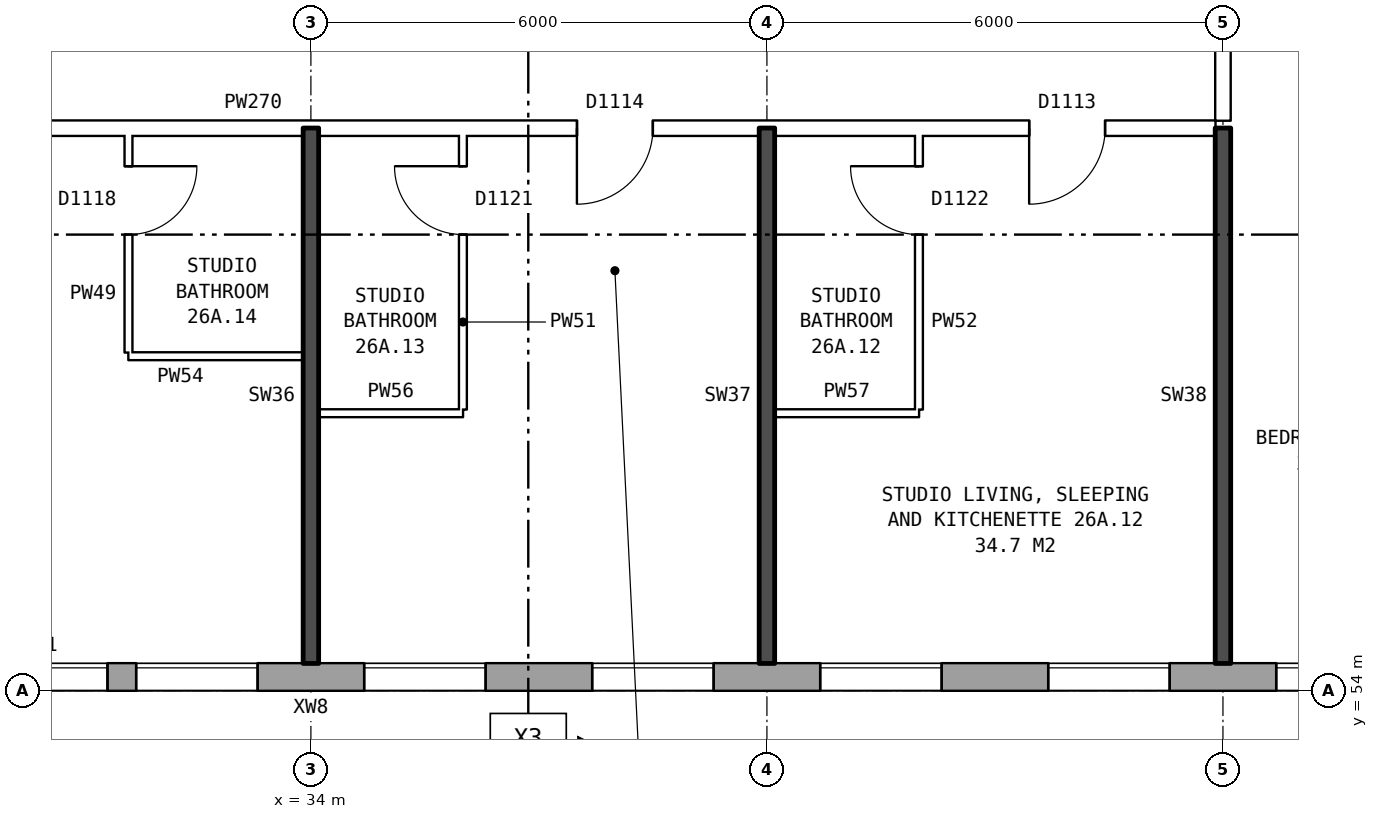
"""IFC4 building model, lengths in metres.
Left out: names, types, materials, properties, quantities, classifications, styles, units other than length and angle.
Written with IfcOpenShell. Run it as: python <this file> out.ifc"""

import sys

from ifc_helpers import new_model, si_unit, direction, frame, frame_2d, origin, place, context, subcontext, project, spatial, rectangle, extrude, element, fill, save


model = new_model("IFC4")
c1 = context("Model", 3, precision=1e-05, world=origin(), true_north=direction((0.0, 1.0)))
c2 = subcontext(c1, "Body", "Model", "MODEL_VIEW")
j1 = project(units=[si_unit("LENGTHUNIT", "METRE"), si_unit("PLANEANGLEUNIT", "RADIAN")], contexts=[c1])
p1 = place(None, origin())
s1 = spatial("IfcSite", under=j1, at=p1, CompositionType="ELEMENT")
p2 = place(p1, origin())
s2 = spatial("IfcBuilding", under=s1, at=p2, CompositionType="ELEMENT")
p3 = place(p2, frame((0.0, 0.0, 96.4)))
s3 = spatial("IfcBuildingStorey", under=s2, at=p3, CompositionType="ELEMENT", Elevation=96.4)
p4 = place(p3, frame((28.075, 54.18, 0.0), z_axis=(0.0, 0.0, 1.0), x_axis=(1.0, 0.0, 0.0)))
e1 = element("IfcWall", 1, at=p4, inside=s3, PredefinedType="STANDARD", context=c2, shape_type="SweptSolid", body=[
    extrude(rectangle(XDim=44.851, YDim=0.36, at=frame_2d((22.425, 0.0))), origin(), (0.0, 0.0, 1.0), 2.85),
])
p5 = place(p4, frame((0.4, 0.0, 0.8)))
e2 = element("IfcOpeningElement", 2, at=p5, cuts=e1, PredefinedType="OPENING", context=c2, shape_type="SweptSolid", body=[
    extrude(rectangle(XDim=0.8, YDim=0.9, at=frame_2d((0.4, 0.45))), frame((0.0, 0.19, 0.0), z_axis=(0.0, -1.0, 0.0), x_axis=(1.0, 0.0, 0.0)), (0.0, 0.0, 1.0), 0.38),
])
p6 = place(p4, frame((3.625, 0.0, 0.8)))
e3 = element("IfcOpeningElement", 3, at=p6, cuts=e1, PredefinedType="OPENING", context=c2, shape_type="SweptSolid", body=[
    extrude(rectangle(XDim=1.6, YDim=1.8, at=frame_2d((0.8, 0.9))), frame((0.0, 0.19, 0.0), z_axis=(0.0, -1.0, 0.0), x_axis=(1.0, 0.0, 0.0)), (0.0, 0.0, 1.0), 0.38),
])
p7 = place(p4, frame((6.625, 0.0, 0.8)))
e4 = element("IfcOpeningElement", 4, at=p7, cuts=e1, PredefinedType="OPENING", context=c2, shape_type="SweptSolid", body=[
    extrude(rectangle(XDim=1.6, YDim=1.8, at=frame_2d((0.8, 0.9))), frame((0.0, 0.19, 0.0), z_axis=(0.0, -1.0, 0.0), x_axis=(1.0, 0.0, 0.0)), (0.0, 0.0, 1.0), 0.38),
])
p8 = place(p4, frame((9.625, 0.0, 0.8)))
e5 = element("IfcOpeningElement", 5, at=p8, cuts=e1, PredefinedType="OPENING", context=c2, shape_type="SweptSolid", body=[
    extrude(rectangle(XDim=1.6, YDim=1.8, at=frame_2d((0.8, 0.9))), frame((0.0, 0.19, 0.0), z_axis=(0.0, -1.0, 0.0), x_axis=(1.0, 0.0, 0.0)), (0.0, 0.0, 1.0), 0.38),
])
p9 = place(p4, frame((12.625, 0.0, 0.8)))
e6 = element("IfcOpeningElement", 6, at=p9, cuts=e1, PredefinedType="OPENING", context=c2, shape_type="SweptSolid", body=[
    extrude(rectangle(XDim=1.6, YDim=1.8, at=frame_2d((0.8, 0.9))), frame((0.0, 0.19, 0.0), z_axis=(0.0, -1.0, 0.0), x_axis=(1.0, 0.0, 0.0)), (0.0, 0.0, 1.0), 0.38),
])
p10 = place(p4, frame((15.625, 0.0, 0.8)))
e7 = element("IfcOpeningElement", 7, at=p10, cuts=e1, PredefinedType="OPENING", context=c2, shape_type="SweptSolid", body=[
    extrude(rectangle(XDim=1.6, YDim=1.8, at=frame_2d((0.8, 0.9))), frame((0.0, 0.19, 0.0), z_axis=(0.0, -1.0, 0.0), x_axis=(1.0, 0.0, 0.0)), (0.0, 0.0, 1.0), 0.38),
])
p11 = place(p4, frame((18.625, 0.0, 0.8)))
e8 = element("IfcOpeningElement", 8, at=p11, cuts=e1, PredefinedType="OPENING", context=c2, shape_type="SweptSolid", body=[
    extrude(rectangle(XDim=1.6, YDim=1.8, at=frame_2d((0.8, 0.9))), frame((0.0, 0.19, 0.0), z_axis=(0.0, -1.0, 0.0), x_axis=(1.0, 0.0, 0.0)), (0.0, 0.0, 1.0), 0.38),
])
p12 = place(p4, frame((21.625, 0.0, 0.8)))
e9 = element("IfcOpeningElement", 9, at=p12, cuts=e1, PredefinedType="OPENING", context=c2, shape_type="SweptSolid", body=[
    extrude(rectangle(XDim=1.6, YDim=1.8, at=frame_2d((0.8, 0.9))), frame((0.0, 0.19, 0.0), z_axis=(0.0, -1.0, 0.0), x_axis=(1.0, 0.0, 0.0)), (0.0, 0.0, 1.0), 0.38),
])
p13 = place(p4, frame((24.625, 0.0, 0.8)))
e10 = element("IfcOpeningElement", 10, at=p13, cuts=e1, PredefinedType="OPENING", context=c2, shape_type="SweptSolid", body=[
    extrude(rectangle(XDim=1.6, YDim=1.8, at=frame_2d((0.8, 0.9))), frame((0.0, 0.19, 0.0), z_axis=(0.0, -1.0, 0.0), x_axis=(1.0, 0.0, 0.0)), (0.0, 0.0, 1.0), 0.38),
])
p14 = place(p4, frame((27.625, 0.0, 0.8)))
e11 = element("IfcOpeningElement", 11, at=p14, cuts=e1, PredefinedType="OPENING", context=c2, shape_type="SweptSolid", body=[
    extrude(rectangle(XDim=1.6, YDim=1.8, at=frame_2d((0.8, 0.9))), frame((0.0, 0.19, 0.0), z_axis=(0.0, -1.0, 0.0), x_axis=(1.0, 0.0, 0.0)), (0.0, 0.0, 1.0), 0.38),
])
p15 = place(p4, frame((30.625, 0.0, 0.8)))
e12 = element("IfcOpeningElement", 12, at=p15, cuts=e1, PredefinedType="OPENING", context=c2, shape_type="SweptSolid", body=[
    extrude(rectangle(XDim=1.6, YDim=1.8, at=frame_2d((0.8, 0.9))), frame((0.0, 0.19, 0.0), z_axis=(0.0, -1.0, 0.0), x_axis=(1.0, 0.0, 0.0)), (0.0, 0.0, 1.0), 0.38),
])
p16 = place(p4, frame((33.625, 0.0, 0.8)))
e13 = element("IfcOpeningElement", 13, at=p16, cuts=e1, PredefinedType="OPENING", context=c2, shape_type="SweptSolid", body=[
    extrude(rectangle(XDim=1.6, YDim=1.8, at=frame_2d((0.8, 0.9))), frame((0.0, 0.19, 0.0), z_axis=(0.0, -1.0, 0.0), x_axis=(1.0, 0.0, 0.0)), (0.0, 0.0, 1.0), 0.38),
])
p17 = place(p4, frame((36.625, 0.0, 0.8)))
e14 = element("IfcOpeningElement", 14, at=p17, cuts=e1, PredefinedType="OPENING", context=c2, shape_type="SweptSolid", body=[
    extrude(rectangle(XDim=1.6, YDim=1.8, at=frame_2d((0.8, 0.9))), frame((0.0, 0.19, 0.0), z_axis=(0.0, -1.0, 0.0), x_axis=(1.0, 0.0, 0.0)), (0.0, 0.0, 1.0), 0.38),
])
p18 = place(p4, frame((39.625, 0.0, 0.8)))
e15 = element("IfcOpeningElement", 15, at=p18, cuts=e1, PredefinedType="OPENING", context=c2, shape_type="SweptSolid", body=[
    extrude(rectangle(XDim=1.6, YDim=1.8, at=frame_2d((0.8, 0.9))), frame((0.0, 0.19, 0.0), z_axis=(0.0, -1.0, 0.0), x_axis=(1.0, 0.0, 0.0)), (0.0, 0.0, 1.0), 0.38),
])
p19 = place(p4, frame((42.125, 0.0, 0.8)))
e16 = element("IfcOpeningElement", 16, at=p19, cuts=e1, PredefinedType="OPENING", context=c2, shape_type="SweptSolid", body=[
    extrude(rectangle(XDim=1.0, YDim=1.8, at=frame_2d((0.5, 0.9))), frame((0.0, 0.19, 0.0), z_axis=(0.0, -1.0, 0.0), x_axis=(1.0, 0.0, 0.0)), (0.0, 0.0, 1.0), 0.38),
])
p20 = place(p4, frame((1.65, 0.0, 0.8)))
e17 = element("IfcOpeningElement", 17, at=p20, cuts=e1, PredefinedType="OPENING", context=c2, shape_type="SweptSolid", body=[
    extrude(rectangle(XDim=1.6, YDim=1.8, at=frame_2d((0.8, 0.9))), frame((0.0, 0.19, 0.0), z_axis=(0.0, -1.0, 0.0), x_axis=(1.0, 0.0, 0.0)), (0.0, 0.0, 1.0), 0.38),
])
p21 = place(p4, frame((43.425, 0.0, 0.8)))
e18 = element("IfcOpeningElement", 18, at=p21, cuts=e1, PredefinedType="OPENING", context=c2, shape_type="SweptSolid", body=[
    extrude(rectangle(XDim=1.0, YDim=0.9, at=frame_2d((0.5, 0.45))), frame((0.0, 0.19, 0.0), z_axis=(0.0, -1.0, 0.0), x_axis=(1.0, 0.0, 0.0)), (0.0, 0.0, 1.0), 0.38),
])
for number, where, z_axis, x_axis in (
    (19, (34.1, 57.65, 0.0), (0.0, 0.0, 1.0), (1.0, 0.0, 0.0)),
    (20, (40.1, 57.65, 0.0), (0.0, 0.0, 1.0), (1.0, 0.0, 0.0)),
):
    element("IfcWall", number, at=place(p3, frame(where, z_axis=z_axis, x_axis=x_axis)), inside=s3, PredefinedType="PARTITIONING", context=c2, shape_type="SweptSolid", body=[
        extrude(rectangle(XDim=1.9, YDim=0.1, at=frame_2d((0.95, 0.0))), origin(), (0.0, 0.0, 1.0), 2.85),
    ])
p22 = place(p3, frame((31.6, 58.4, 0.0), z_axis=(0.0, 0.0, 1.0), x_axis=(1.0, 0.0, 0.0)))
e21 = element("IfcWall", 21, at=p22, inside=s3, PredefinedType="PARTITIONING", context=c2, shape_type="SweptSolid", body=[
    extrude(rectangle(XDim=2.3, YDim=0.1, at=frame_2d((1.15, 0.0))), origin(), (0.0, 0.0, 1.0), 2.85),
])
p23 = place(p3, frame((25.36, 61.4, 0.0), z_axis=(0.0, 0.0, 1.0), x_axis=(1.0, 0.0, 0.0)))
e22 = element("IfcWall", 22, at=p23, inside=s3, PredefinedType="PARTITIONING", context=c2, shape_type="SweptSolid", body=[
    extrude(rectangle(XDim=20.54, YDim=0.2, at=frame_2d((10.27, 0.0))), origin(), (0.0, 0.0, 1.0), 2.85),
])
p24 = place(p23, frame((18.09, 0.0, 0.0)))
e23 = element("IfcOpeningElement", 23, at=p24, cuts=e22, PredefinedType="OPENING", context=c2, shape_type="SweptSolid", body=[
    extrude(rectangle(XDim=1.0, YDim=2.1, at=frame_2d((0.5, 1.05))), frame((0.0, 0.11, 0.0), z_axis=(0.0, -1.0, 0.0), x_axis=(1.0, 0.0, 0.0)), (0.0, 0.0, 1.0), 0.22),
])
p25 = place(p23, frame((12.14, 0.0, 0.0)))
e24 = element("IfcOpeningElement", 24, at=p25, cuts=e22, PredefinedType="OPENING", context=c2, shape_type="SweptSolid", body=[
    extrude(rectangle(XDim=1.0, YDim=2.1, at=frame_2d((0.5, 1.05))), frame((0.0, 0.11, 0.0), z_axis=(0.0, -1.0, 0.0), x_axis=(1.0, 0.0, 0.0)), (0.0, 0.0, 1.0), 0.22),
])
p26 = place(p23, frame((2.62, 0.0, 0.0)))
e25 = element("IfcOpeningElement", 25, at=p26, cuts=e22, PredefinedType="OPENING", context=c2, shape_type="SweptSolid", body=[
    extrude(rectangle(XDim=1.0, YDim=2.1, at=frame_2d((0.5, 1.05))), frame((0.0, 0.11, 0.0), z_axis=(0.0, -1.0, 0.0), x_axis=(1.0, 0.0, 0.0)), (0.0, 0.0, 1.0), 0.22),
])
p27 = place(p3, frame((31.6, 58.45, 0.0), z_axis=(0.0, 0.0, 1.0), x_axis=(0.0, 1.0, 0.0)))
e26 = element("IfcWall", 26, at=p27, inside=s3, PredefinedType="PARTITIONING", context=c2, shape_type="SweptSolid", body=[
    extrude(rectangle(XDim=2.85, YDim=0.1, at=frame_2d((1.425, 0.0))), origin(), (0.0, 0.0, 1.0), 2.85),
])
p28 = place(p27, frame((1.55, 0.0, 0.0)))
e27 = element("IfcOpeningElement", 27, at=p28, cuts=e26, PredefinedType="OPENING", context=c2, shape_type="SweptSolid", body=[
    extrude(rectangle(XDim=0.9, YDim=2.1, at=frame_2d((0.45, 1.05))), frame((0.0, 0.06, 0.0), z_axis=(0.0, -1.0, 0.0), x_axis=(1.0, 0.0, 0.0)), (0.0, 0.0, 1.0), 0.12),
])
p29 = place(p3, frame((34.0, 54.36, 0.0), z_axis=(0.0, 0.0, 1.0), x_axis=(0.0, 1.0, 0.0)))
e28 = element("IfcWall", 28, at=p29, inside=s3, PredefinedType="SOLIDWALL", context=c2, shape_type="SweptSolid", body=[
    extrude(rectangle(XDim=7.04, YDim=0.2, at=frame_2d((3.52, 0.0))), origin(), (0.0, 0.0, 1.0), 2.85),
])
p30 = place(p3, frame((36.0, 57.7, 0.0), z_axis=(0.0, 0.0, 1.0), x_axis=(0.0, 1.0, 0.0)))
e29 = element("IfcWall", 29, at=p30, inside=s3, PredefinedType="PARTITIONING", context=c2, shape_type="SweptSolid", body=[
    extrude(rectangle(XDim=3.6, YDim=0.1, at=frame_2d((1.8, 0.0))), origin(), (0.0, 0.0, 1.0), 2.85),
])
p31 = place(p30, frame((2.3, 0.0, 0.0)))
e30 = element("IfcOpeningElement", 30, at=p31, cuts=e29, PredefinedType="OPENING", context=c2, shape_type="SweptSolid", body=[
    extrude(rectangle(XDim=0.9, YDim=2.1, at=frame_2d((0.45, 1.05))), frame((0.0, 0.06, 0.0), z_axis=(0.0, -1.0, 0.0), x_axis=(1.0, 0.0, 0.0)), (0.0, 0.0, 1.0), 0.12),
])
p32 = place(p3, frame((40.0, 54.36, 0.0), z_axis=(0.0, 0.0, 1.0), x_axis=(0.0, 1.0, 0.0)))
e31 = element("IfcWall", 31, at=p32, inside=s3, PredefinedType="SOLIDWALL", context=c2, shape_type="SweptSolid", body=[
    extrude(rectangle(XDim=7.04, YDim=0.2, at=frame_2d((3.52, 0.0))), origin(), (0.0, 0.0, 1.0), 2.85),
])
p33 = place(p3, frame((42.0, 57.7, 0.0), z_axis=(0.0, 0.0, 1.0), x_axis=(0.0, 1.0, 0.0)))
e32 = element("IfcWall", 32, at=p33, inside=s3, PredefinedType="PARTITIONING", context=c2, shape_type="SweptSolid", body=[
    extrude(rectangle(XDim=3.6, YDim=0.1, at=frame_2d((1.8, 0.0))), origin(), (0.0, 0.0, 1.0), 2.85),
])
p34 = place(p33, frame((2.3, 0.0, 0.0)))
e33 = element("IfcOpeningElement", 33, at=p34, cuts=e32, PredefinedType="OPENING", context=c2, shape_type="SweptSolid", body=[
    extrude(rectangle(XDim=0.9, YDim=2.1, at=frame_2d((0.45, 1.05))), frame((0.0, 0.06, 0.0), z_axis=(0.0, -1.0, 0.0), x_axis=(1.0, 0.0, 0.0)), (0.0, 0.0, 1.0), 0.12),
])
p35 = place(p3, frame((46.0, 54.36, 0.0), z_axis=(0.0, 0.0, 1.0), x_axis=(0.0, 1.0, 0.0)))
e34 = element("IfcWall", 34, at=p35, inside=s3, PredefinedType="SOLIDWALL", context=c2, shape_type="SweptSolid", body=[
    extrude(rectangle(XDim=7.04, YDim=0.2, at=frame_2d((3.52, 0.0))), origin(), (0.0, 0.0, 1.0), 2.85),
])
p36 = place(p3, frame((46.0, 61.5, 0.0), z_axis=(0.0, 0.0, 1.0), x_axis=(0.0, 1.0, 0.0)))
e35 = element("IfcWall", 35, at=p36, inside=s3, PredefinedType="PARTITIONING", context=c2, shape_type="SweptSolid", body=[
    extrude(rectangle(XDim=2.2, YDim=0.2, at=frame_2d((1.1, 0.0))), origin(), (0.0, 0.0, 1.0), 2.85),
])
p37 = place(p6, origin())
e36 = element("IfcWindow", 36, at=p37, inside=s3, PartitioningType="SINGLE_PANEL", PredefinedType="WINDOW", context=c2, shape_type="SweptSolid", body=[
    extrude(rectangle(XDim=1.6, YDim=1.8, at=frame_2d((0.8, 0.9))), frame((0.0, 0.15, 0.0), z_axis=(0.0, -1.0, 0.0), x_axis=(1.0, 0.0, 0.0)), (0.0, 0.0, 1.0), 0.06),
])
fill(e3, e36)
p38 = place(p7, origin())
e37 = element("IfcWindow", 37, at=p38, inside=s3, PartitioningType="SINGLE_PANEL", PredefinedType="WINDOW", context=c2, shape_type="SweptSolid", body=[
    extrude(rectangle(XDim=1.6, YDim=1.8, at=frame_2d((0.8, 0.9))), frame((0.0, 0.15, 0.0), z_axis=(0.0, -1.0, 0.0), x_axis=(1.0, 0.0, 0.0)), (0.0, 0.0, 1.0), 0.06),
])
fill(e4, e37)
p39 = place(p8, origin())
e38 = element("IfcWindow", 38, at=p39, inside=s3, PartitioningType="SINGLE_PANEL", PredefinedType="WINDOW", context=c2, shape_type="SweptSolid", body=[
    extrude(rectangle(XDim=1.6, YDim=1.8, at=frame_2d((0.8, 0.9))), frame((0.0, 0.15, 0.0), z_axis=(0.0, -1.0, 0.0), x_axis=(1.0, 0.0, 0.0)), (0.0, 0.0, 1.0), 0.06),
])
fill(e5, e38)
p40 = place(p9, origin())
e39 = element("IfcWindow", 39, at=p40, inside=s3, PartitioningType="SINGLE_PANEL", PredefinedType="WINDOW", context=c2, shape_type="SweptSolid", body=[
    extrude(rectangle(XDim=1.6, YDim=1.8, at=frame_2d((0.8, 0.9))), frame((0.0, 0.15, 0.0), z_axis=(0.0, -1.0, 0.0), x_axis=(1.0, 0.0, 0.0)), (0.0, 0.0, 1.0), 0.06),
])
fill(e6, e39)
p41 = place(p10, origin())
e40 = element("IfcWindow", 40, at=p41, inside=s3, PartitioningType="SINGLE_PANEL", PredefinedType="WINDOW", context=c2, shape_type="SweptSolid", body=[
    extrude(rectangle(XDim=1.6, YDim=1.8, at=frame_2d((0.8, 0.9))), frame((0.0, 0.15, 0.0), z_axis=(0.0, -1.0, 0.0), x_axis=(1.0, 0.0, 0.0)), (0.0, 0.0, 1.0), 0.06),
])
fill(e7, e40)
p42 = place(p11, origin())
e41 = element("IfcWindow", 41, at=p42, inside=s3, PartitioningType="SINGLE_PANEL", PredefinedType="WINDOW", context=c2, shape_type="SweptSolid", body=[
    extrude(rectangle(XDim=1.6, YDim=1.8, at=frame_2d((0.8, 0.9))), frame((0.0, 0.15, 0.0), z_axis=(0.0, -1.0, 0.0), x_axis=(1.0, 0.0, 0.0)), (0.0, 0.0, 1.0), 0.06),
])
fill(e8, e41)
p43 = place(p24, frame((1.0, 0.0, 0.0), z_axis=(0.0, 0.0, 1.0), x_axis=(-1.0, 0.0, 0.0)))
e42 = element("IfcDoor", 42, at=p43, inside=s3, OperationType="SINGLE_SWING_RIGHT", PredefinedType="DOOR", context=c2, shape_type="SweptSolid", body=[
    extrude(rectangle(XDim=1.0, YDim=2.1, at=frame_2d((0.5, 1.05))), frame((0.0, 0.025, 0.0), z_axis=(0.0, -1.0, 0.0), x_axis=(1.0, 0.0, 0.0)), (0.0, 0.0, 1.0), 0.05),
])
fill(e23, e42)
p44 = place(p34, origin())
e43 = element("IfcDoor", 43, at=p44, inside=s3, OperationType="SINGLE_SWING_RIGHT", PredefinedType="DOOR", context=c2, shape_type="SweptSolid", body=[
    extrude(rectangle(XDim=0.9, YDim=2.1, at=frame_2d((0.45, 1.05))), frame((0.0, 0.025, 0.0), z_axis=(0.0, -1.0, 0.0), x_axis=(1.0, 0.0, 0.0)), (0.0, 0.0, 1.0), 0.05),
])
fill(e33, e43)
p45 = place(p25, frame((1.0, 0.0, 0.0), z_axis=(0.0, 0.0, 1.0), x_axis=(-1.0, 0.0, 0.0)))
e44 = element("IfcDoor", 44, at=p45, inside=s3, OperationType="SINGLE_SWING_RIGHT", PredefinedType="DOOR", context=c2, shape_type="SweptSolid", body=[
    extrude(rectangle(XDim=1.0, YDim=2.1, at=frame_2d((0.5, 1.05))), frame((0.0, 0.025, 0.0), z_axis=(0.0, -1.0, 0.0), x_axis=(1.0, 0.0, 0.0)), (0.0, 0.0, 1.0), 0.05),
])
fill(e24, e44)
p46 = place(p31, origin())
e45 = element("IfcDoor", 45, at=p46, inside=s3, OperationType="SINGLE_SWING_RIGHT", PredefinedType="DOOR", context=c2, shape_type="SweptSolid", body=[
    extrude(rectangle(XDim=0.9, YDim=2.1, at=frame_2d((0.45, 1.05))), frame((0.0, 0.025, 0.0), z_axis=(0.0, -1.0, 0.0), x_axis=(1.0, 0.0, 0.0)), (0.0, 0.0, 1.0), 0.05),
])
fill(e30, e45)
p47 = place(p28, frame((0.9, 0.0, 0.0), z_axis=(0.0, 0.0, 1.0), x_axis=(-1.0, 0.0, 0.0)))
e46 = element("IfcDoor", 46, at=p47, inside=s3, OperationType="SINGLE_SWING_LEFT", PredefinedType="DOOR", context=c2, shape_type="SweptSolid", body=[
    extrude(rectangle(XDim=0.9, YDim=2.1, at=frame_2d((0.45, 1.05))), frame((0.0, 0.025, 0.0), z_axis=(0.0, -1.0, 0.0), x_axis=(1.0, 0.0, 0.0)), (0.0, 0.0, 1.0), 0.05),
])
fill(e27, e46)
p48 = place(p20, origin())
e47 = element("IfcWindow", 47, at=p48, inside=s3, PartitioningType="SINGLE_PANEL", PredefinedType="WINDOW", context=c2, shape_type="SweptSolid", body=[
    extrude(rectangle(XDim=1.6, YDim=1.8, at=frame_2d((0.8, 0.9))), frame((0.0, 0.15, 0.0), z_axis=(0.0, -1.0, 0.0), x_axis=(1.0, 0.0, 0.0)), (0.0, 0.0, 1.0), 0.06),
])
fill(e17, e47)
save(model, sys.argv[1])
